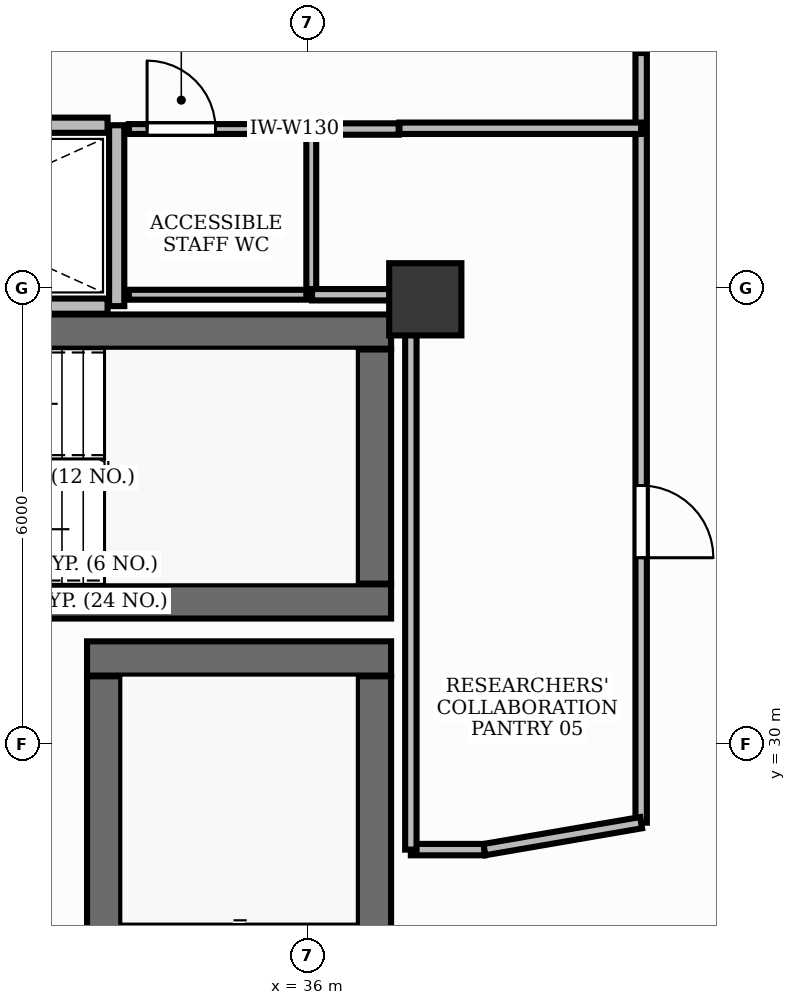
"""IFC4 building model, lengths in metres.
Left out: names, types, materials, properties, quantities, classifications, styles, units other than length and angle.
Written with IfcOpenShell. Run it as: python <this file> out.ifc"""

import sys

from ifc_helpers import new_model, si_unit, direction, frame, frame_2d, origin, origin_2d, place, context, subcontext, project, spatial, rectangle, extrude, element, fill, save


model = new_model("IFC4")
c1 = context("Model", 3, precision=1e-05, world=origin(), true_north=direction((0.0, 1.0)))
c2 = subcontext(c1, "Body", "Model", "MODEL_VIEW")
j1 = project(units=[si_unit("LENGTHUNIT", "METRE"), si_unit("PLANEANGLEUNIT", "RADIAN")], contexts=[c1])
p1 = place(None, origin())
s1 = spatial("IfcSite", under=j1, at=p1, CompositionType="ELEMENT")
p2 = place(p1, origin())
s2 = spatial("IfcBuilding", under=s1, at=p2, CompositionType="ELEMENT")
p3 = place(p2, frame((0.0, 0.0, 80.4)))
s3 = spatial("IfcBuildingStorey", under=s2, at=p3, CompositionType="ELEMENT", Elevation=80.4)
p4 = place(p3, frame((28.852, 35.425, 0.0), z_axis=(0.0, 0.0, 1.0), x_axis=(1.0, 0.0, 0.0)))
e1 = element("IfcWall", 1, at=p4, inside=s3, PredefinedType="SHEAR", context=c2, shape_type="SweptSolid", body=[
    extrude(rectangle(XDim=8.248, YDim=0.45, at=frame_2d((4.124, 0.0))), origin(), (0.0, 0.0, 1.0), 3.88),
])
p5 = place(p3, frame((28.35, 31.875, 0.0), z_axis=(0.0, 0.0, 1.0), x_axis=(1.0, 0.0, 0.0)))
e2 = element("IfcWall", 2, at=p5, inside=s3, PredefinedType="SHEAR", context=c2, shape_type="SweptSolid", body=[
    extrude(rectangle(XDim=8.75, YDim=0.45, at=frame_2d((4.375, 0.0))), origin(), (0.0, 0.0, 1.0), 3.88),
])
p6 = place(p3, frame((36.875, 32.11, 0.0), z_axis=(0.0, 0.0, 1.0), x_axis=(0.0, 1.0, 0.0)))
e3 = element("IfcWall", 3, at=p6, inside=s3, PredefinedType="SHEAR", context=c2, shape_type="SweptSolid", body=[
    extrude(rectangle(XDim=3.08, YDim=0.45, at=frame_2d((1.54, 0.0))), origin(), (0.0, 0.0, 1.0), 3.88),
])
p7 = place(p3, frame((33.1, 31.125, 0.0), z_axis=(0.0, 0.0, 1.0), x_axis=(1.0, 0.0, 0.0)))
e4 = element("IfcWall", 4, at=p7, inside=s3, PredefinedType="SHEAR", context=c2, shape_type="SweptSolid", body=[
    extrude(rectangle(XDim=4.0, YDim=0.45, at=frame_2d((2.0, 0.0))), origin(), (0.0, 0.0, 1.0), 3.88),
])
p8 = place(p3, frame((36.875, 23.11, 0.0), z_axis=(0.0, 0.0, 1.0), x_axis=(0.0, 1.0, 0.0)))
e5 = element("IfcWall", 5, at=p8, inside=s3, PredefinedType="SHEAR", context=c2, shape_type="SweptSolid", body=[
    extrude(rectangle(XDim=7.78, YDim=0.45, at=frame_2d((3.89, 0.0))), origin(), (0.0, 0.0, 1.0), 3.88),
])
p9 = place(p3, frame((33.325, 23.11, 0.0), z_axis=(0.0, 0.0, 1.0), x_axis=(0.0, 1.0, 0.0)))
e6 = element("IfcWall", 6, at=p9, inside=s3, PredefinedType="SHEAR", context=c2, shape_type="SweptSolid", body=[
    extrude(rectangle(XDim=7.78, YDim=0.45, at=frame_2d((3.89, 0.0))), origin(), (0.0, 0.0, 1.0), 3.88),
])
p10 = place(p9, frame((0.2, 0.0, 0.0)))
e7 = element("IfcOpeningElement", 7, at=p10, cuts=e6, PredefinedType="OPENING", context=c2, shape_type="SweptSolid", body=[
    extrude(rectangle(XDim=1.05, YDim=2.15, at=frame_2d((0.525, 1.075))), frame((0.0, 0.24, 0.0), z_axis=(0.0, -1.0, 0.0), x_axis=(1.0, 0.0, 0.0)), (0.0, 0.0, 1.0), 0.48),
])
p11 = place(p3, frame((37.55, 35.85, -0.0), z_axis=(0.0, 0.0, 1.0), x_axis=(1.0, 0.0, 0.0)))
e8 = element("IfcColumn", 8, at=p11, inside=s3, PredefinedType="PILASTER", context=c2, shape_type="SweptSolid", body=[
    extrude(rectangle(XDim=0.95, YDim=0.95, at=origin_2d()), origin(), (0.0, 0.0, 1.0), 3.881),
])
p12 = place(p3, frame((33.49, 35.76, 0.0), z_axis=(0.0, 0.0, 1.0), x_axis=(0.0, 1.0, 0.0)))
e9 = element("IfcWall", 9, at=p12, inside=s3, PredefinedType="PARTITIONING", context=c2, shape_type="SweptSolid", body=[
    extrude(rectangle(XDim=2.38, YDim=0.2, at=frame_2d((1.19, 0.0))), origin(), (0.0, 0.0, 1.0), 2.22),
])
for number, where, z_axis, x_axis in (
    (10, (28.8, 35.76, 0.0), (0.0, 0.0, 1.0), (1.0, 0.0, 0.0)),
    (11, (28.8, 38.14, 0.0), (0.0, 0.0, 1.0), (1.0, 0.0, 0.0)),
):
    element("IfcWall", number, at=place(p3, frame(where, z_axis=z_axis, x_axis=x_axis)), inside=s3, PredefinedType="PARTITIONING", context=c2, shape_type="SweptSolid", body=[
        extrude(rectangle(XDim=4.57, YDim=0.2, at=frame_2d((2.285, 0.0))), origin(), (0.0, 0.0, 1.0), 2.22),
    ])
p13 = place(p3, frame((33.65, 38.09, 0.0), z_axis=(0.0, 0.0, 1.0), x_axis=(1.0, 0.0, 0.0)))
e12 = element("IfcWall", 12, at=p13, inside=s3, PredefinedType="PARTITIONING", context=c2, shape_type="SweptSolid", body=[
    extrude(rectangle(XDim=2.4, YDim=0.13, at=frame_2d((1.2, 0.0))), origin(), (0.0, 0.0, 1.0), 2.22),
])
p14 = place(p13, frame((0.24, 0.0, 0.0)))
e13 = element("IfcOpeningElement", 13, at=p14, cuts=e12, PredefinedType="OPENING", context=c2, shape_type="SweptSolid", body=[
    extrude(rectangle(XDim=0.9, YDim=2.15, at=frame_2d((0.45, 1.075))), frame((0.0, 0.08, 0.0), z_axis=(0.0, -1.0, 0.0), x_axis=(1.0, 0.0, 0.0)), (0.0, 0.0, 1.0), 0.16),
])
p15 = place(p3, frame((40.39, 39.09, 0.0), z_axis=(0.0, 0.0, 1.0), x_axis=(0.0, -1.0, 0.0)))
e14 = element("IfcWall", 14, at=p15, inside=s3, PredefinedType="PARTITIONING", context=c2, shape_type="SweptSolid", body=[
    extrude(rectangle(XDim=10.125, YDim=0.15, at=frame_2d((5.063, 0.0))), origin(), (0.0, 0.0, 1.0), 2.22),
])
p16 = place(p15, frame((5.69, 0.0, 0.0)))
e15 = element("IfcOpeningElement", 15, at=p16, cuts=e14, PredefinedType="OPENING", context=c2, shape_type="SweptSolid", body=[
    extrude(rectangle(XDim=0.95, YDim=2.15, at=frame_2d((0.475, 1.075))), frame((0.0, 0.09, 0.0), z_axis=(0.0, -1.0, 0.0), x_axis=(1.0, 0.0, 0.0)), (0.0, 0.0, 1.0), 0.18),
])
p17 = place(p3, frame((36.05, 35.91, 0.0), z_axis=(0.0, 0.0, 1.0), x_axis=(-1.0, 0.0, 0.0)))
e16 = element("IfcWall", 16, at=p17, inside=s3, PredefinedType="PARTITIONING", context=c2, shape_type="SweptSolid", body=[
    extrude(rectangle(XDim=2.4, YDim=0.13, at=frame_2d((1.2, 0.0))), origin(), (0.0, 0.0, 1.0), 2.22),
])
p18 = place(p3, frame((36.05, 38.09, 0.0), z_axis=(0.0, 0.0, 1.0), x_axis=(0.0, -1.0, 0.0)))
e17 = element("IfcWall", 17, at=p18, inside=s3, PredefinedType="PARTITIONING", context=c2, shape_type="SweptSolid", body=[
    extrude(rectangle(XDim=2.18, YDim=0.13, at=frame_2d((1.09, 0.0))), origin(), (0.0, 0.0, 1.0), 2.22),
])
p19 = place(p3, frame((38.328, 28.61, 0.0), z_axis=(0.0, 0.0, 1.0), x_axis=(-1.0, 0.0, 0.0)))
e18 = element("IfcWall", 18, at=p19, inside=s3, PredefinedType="PARTITIONING", context=c2, shape_type="SweptSolid", body=[
    extrude(rectangle(XDim=0.968, YDim=0.15, at=frame_2d((0.484, 0.0))), origin(), (0.0, 0.0, 1.0), 2.22),
])
p20 = place(p3, frame((37.36, 28.61, 0.0), z_axis=(0.0, 0.0, 1.0), x_axis=(0.0, 1.0, 0.0)))
e19 = element("IfcWall", 19, at=p20, inside=s3, PredefinedType="PARTITIONING", context=c2, shape_type="SweptSolid", body=[
    extrude(rectangle(XDim=7.29, YDim=0.15, at=frame_2d((3.645, 0.0))), origin(), (0.0, 0.0, 1.0), 2.22),
])
p21 = place(p3, frame((37.35, 35.91, 0.0), z_axis=(0.0, 0.0, 1.0), x_axis=(-1.0, 0.0, 0.0)))
e20 = element("IfcWall", 20, at=p21, inside=s3, PredefinedType="PARTITIONING", context=c2, shape_type="SweptSolid", body=[
    extrude(rectangle(XDim=1.29, YDim=0.15, at=frame_2d((0.645, 0.0))), origin(), (0.0, 0.0, 1.0), 2.22),
])
p22 = place(p3, frame((36.06, 38.09, 0.0), z_axis=(0.0, 0.0, 1.0), x_axis=(1.0, 0.0, 0.0)))
e21 = element("IfcWall", 21, at=p22, inside=s3, PredefinedType="PARTITIONING", context=c2, shape_type="SweptSolid", body=[
    extrude(rectangle(XDim=1.14, YDim=0.15, at=frame_2d((0.57, 0.0))), origin(), (0.0, 0.0, 1.0), 2.22),
])
p23 = place(p3, frame((37.21, 38.1, 0.0), z_axis=(0.0, 0.0, 1.0), x_axis=(1.0, 0.0, 0.0)))
e22 = element("IfcWall", 22, at=p23, inside=s3, PredefinedType="PARTITIONING", context=c2, shape_type="SweptSolid", body=[
    extrude(rectangle(XDim=3.18, YDim=0.15, at=frame_2d((1.59, 0.0))), origin(), (0.0, 0.0, 1.0), 2.22),
])
p24 = place(p3, frame((40.39, 28.965, 0.0), z_axis=(0.0, 0.0, 1.0), x_axis=(-0.985545542795, -0.169410693517, 0.0)))
e23 = element("IfcWall", 23, at=p24, inside=s3, PredefinedType="PARTITIONING", context=c2, shape_type="SweptSolid", body=[
    extrude(rectangle(XDim=2.093, YDim=0.15, at=frame_2d((1.046, 0.0))), origin(), (0.0, 0.0, 1.0), 2.22),
])
p25 = place(p14, origin())
e24 = element("IfcDoor", 24, at=p25, inside=s3, OperationType="SINGLE_SWING_LEFT", PredefinedType="DOOR", context=c2, shape_type="SweptSolid", body=[
    extrude(rectangle(XDim=0.9, YDim=2.15, at=frame_2d((0.45, 1.075))), frame((0.0, 0.025, 0.0), z_axis=(0.0, -1.0, 0.0), x_axis=(1.0, 0.0, 0.0)), (0.0, 0.0, 1.0), 0.05),
])
fill(e13, e24)
p26 = place(p16, origin())
e25 = element("IfcDoor", 25, at=p26, inside=s3, OperationType="SINGLE_SWING_RIGHT", PredefinedType="DOOR", context=c2, shape_type="SweptSolid", body=[
    extrude(rectangle(XDim=0.95, YDim=2.15, at=frame_2d((0.475, 1.075))), frame((0.0, 0.025, 0.0), z_axis=(0.0, -1.0, 0.0), x_axis=(1.0, 0.0, 0.0)), (0.0, 0.0, 1.0), 0.05),
])
fill(e15, e25)
save(model, sys.argv[1])
